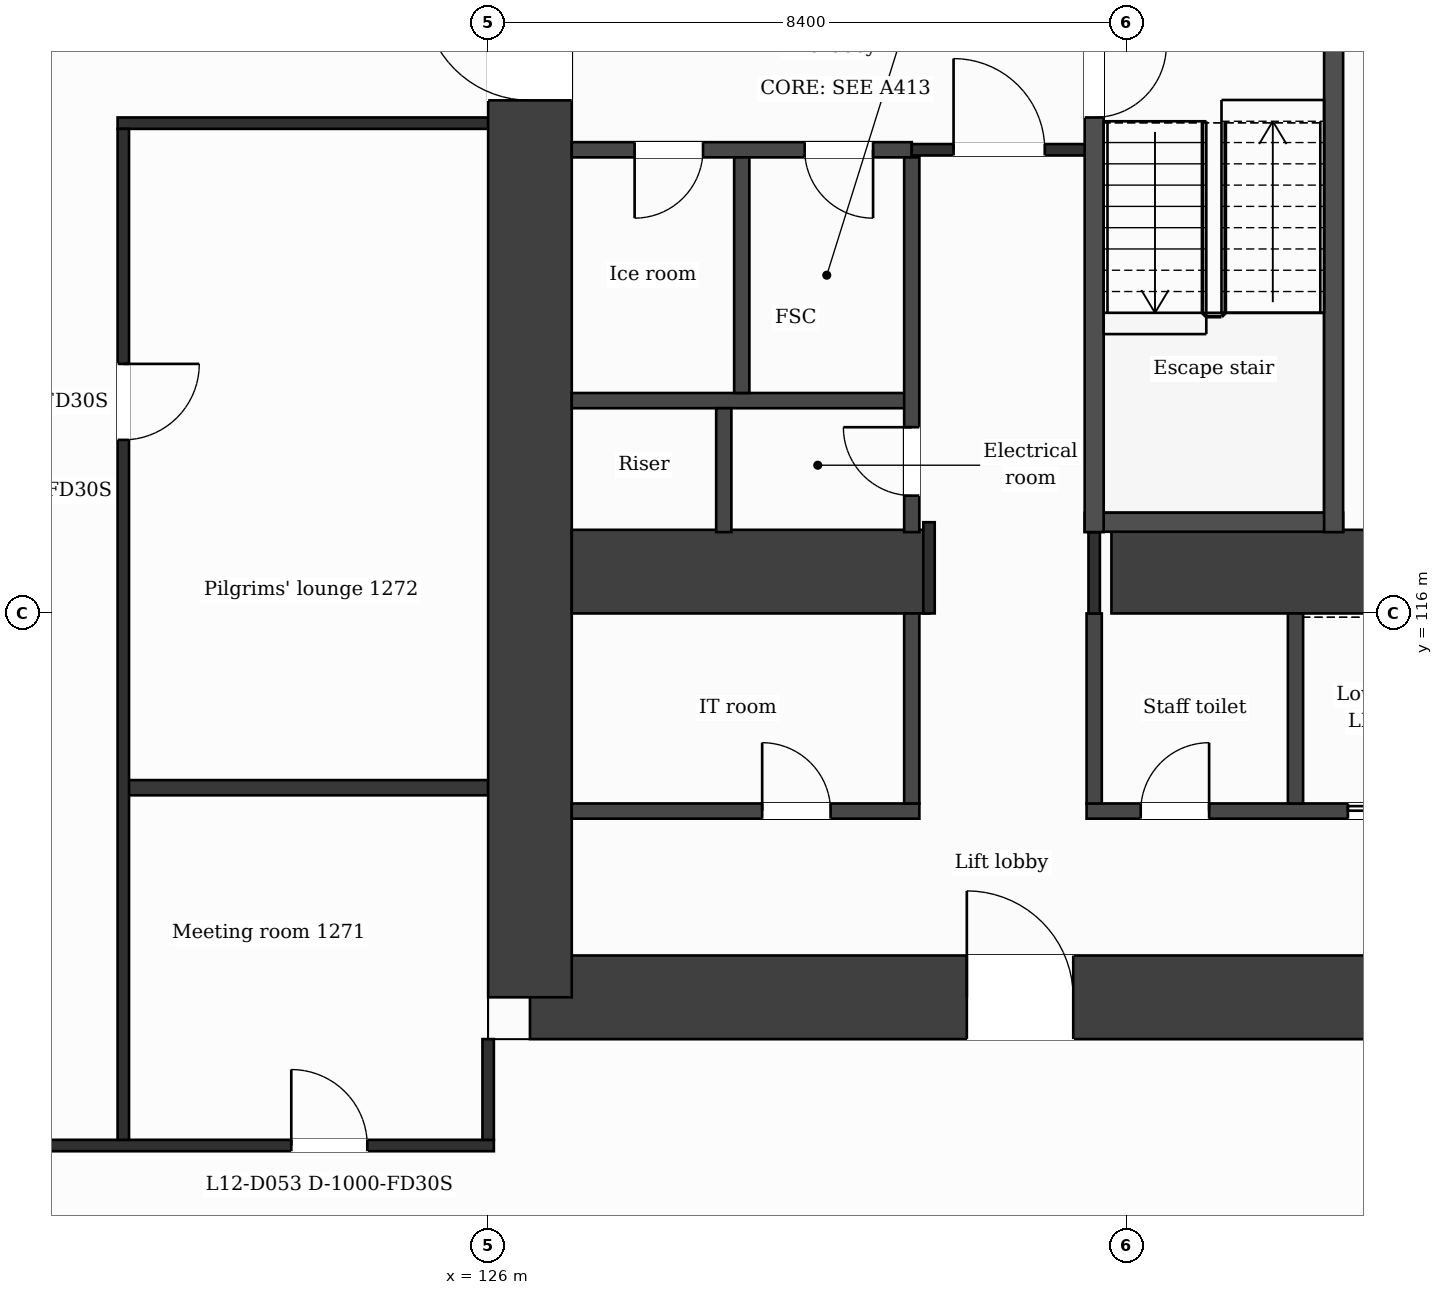
"""IFC4 building model, lengths in metres.
Left out: names, types, materials, properties, quantities, classifications, styles, units other than length and angle.
Written with IfcOpenShell. Run it as: python <this file> out.ifc"""

import sys

from ifc_helpers import new_model, si_unit, direction, frame, frame_2d, origin, place, context, subcontext, project, spatial, rectangle, extrude, element, fill, save


model = new_model("IFC4")
c1 = context("Model", 3, precision=1e-05, world=origin(), true_north=direction((0.0, 1.0)))
c2 = subcontext(c1, "Body", "Model", "MODEL_VIEW")
j1 = project(units=[si_unit("LENGTHUNIT", "METRE"), si_unit("PLANEANGLEUNIT", "RADIAN")], contexts=[c1])
p1 = place(None, origin())
s1 = spatial("IfcSite", under=j1, at=p1, CompositionType="ELEMENT")
p2 = place(p1, origin())
s2 = spatial("IfcBuilding", under=s1, at=p2, CompositionType="ELEMENT")
p3 = place(p2, frame((0.0, 0.0, 60.0)))
s3 = spatial("IfcBuildingStorey", under=s2, at=p3, CompositionType="ELEMENT", Elevation=60.0)
p4 = place(p3, frame((137.688, 131.85, 0.0), z_axis=(0.0, 0.0, 1.0), x_axis=(0.133411793472, -0.991060691059, 0.0)))
e1 = element("IfcWall", 1, at=p4, inside=s3, PredefinedType="SHEAR", context=c2, shape_type="SweptSolid", body=[
    extrude(rectangle(XDim=21.089, YDim=1.1, at=frame_2d((10.544, 0.0))), origin(), (0.0, 0.0, 1.0), 3.5),
])
p5 = place(p3, frame((140.502, 110.95, 0.0), z_axis=(0.0, 0.0, 1.0), x_axis=(-1.0, 0.0, 0.0)))
e2 = element("IfcWall", 2, at=p5, inside=s3, PredefinedType="SHEAR", context=c2, shape_type="SweptSolid", body=[
    extrude(rectangle(XDim=13.952, YDim=1.1, at=frame_2d((6.976, 0.0))), origin(), (0.0, 0.0, 1.0), 3.5),
])
p6 = place(p5, frame((6.804, 0.0, 0.0)))
e3 = element("IfcOpeningElement", 3, at=p6, cuts=e2, PredefinedType="OPENING", context=c2, shape_type="SweptSolid", body=[
    extrude(rectangle(XDim=1.4, YDim=2.1, at=frame_2d((0.7, 1.05))), frame((0.0, 0.56, 0.0), z_axis=(0.0, -1.0, 0.0), x_axis=(1.0, 0.0, 0.0)), (0.0, 0.0, 1.0), 1.12),
])
p7 = place(p3, frame((126.55, 110.95, 0.0), z_axis=(0.0, 0.0, 1.0), x_axis=(0.0, 1.0, 0.0)))
e4 = element("IfcWall", 4, at=p7, inside=s3, PredefinedType="SHEAR", context=c2, shape_type="SweptSolid", body=[
    extrude(rectangle(XDim=20.9, YDim=1.1, at=frame_2d((10.45, 0.0))), origin(), (0.0, 0.0, 1.0), 3.5),
])
p8 = place(p7, frame((11.8, 0.0, 0.0)))
e5 = element("IfcOpeningElement", 5, at=p8, cuts=e4, PredefinedType="OPENING", context=c2, shape_type="SweptSolid", body=[
    extrude(rectangle(XDim=1.4, YDim=2.1, at=frame_2d((0.7, 1.05))), frame((0.0, 0.56, 0.0), z_axis=(0.0, -1.0, 0.0), x_axis=(1.0, 0.0, 0.0)), (0.0, 0.0, 1.0), 1.12),
])
p9 = place(p3, frame((127.1, 116.55, 0.0), z_axis=(0.0, 0.0, 1.0), x_axis=(1.0, 0.0, 0.0)))
e6 = element("IfcWall", 6, at=p9, inside=s3, PredefinedType="SHEAR", context=c2, shape_type="SweptSolid", body=[
    extrude(rectangle(XDim=4.7, YDim=1.1, at=frame_2d((2.35, 0.0))), origin(), (0.0, 0.0, 1.0), 3.5),
])
p10 = place(p3, frame((134.2, 116.55, 0.0), z_axis=(0.0, 0.0, 1.0), x_axis=(1.0, 0.0, 0.0)))
e7 = element("IfcWall", 7, at=p10, inside=s3, PredefinedType="SHEAR", context=c2, shape_type="SweptSolid", body=[
    extrude(rectangle(XDim=5.077, YDim=1.1, at=frame_2d((2.539, 0.0))), origin(), (0.0, 0.0, 1.0), 3.5),
])
p11 = place(p3, frame((100.725, 109.0, 0.0), z_axis=(0.0, 0.0, 1.0), x_axis=(1.0, 0.0, 0.0)))
e8 = element("IfcWall", 8, at=p11, inside=s3, PredefinedType="PARTITIONING", context=c2, shape_type="SweptSolid", body=[
    extrude(rectangle(XDim=25.35, YDim=0.15, at=frame_2d((12.675, 0.0))), origin(), (0.0, 0.0, 1.0), 3.18),
])
p12 = place(p11, frame((1.975, 0.0, 0.0)))
e9 = element("IfcOpeningElement", 9, at=p12, cuts=e8, PredefinedType="OPENING", context=c2, shape_type="SweptSolid", body=[
    extrude(rectangle(XDim=1.0, YDim=2.1, at=frame_2d((0.5, 1.05))), frame((0.0, 0.085, 0.0), z_axis=(0.0, -1.0, 0.0), x_axis=(1.0, 0.0, 0.0)), (0.0, 0.0, 1.0), 0.17),
])
p13 = place(p11, frame((10.325, 0.0, 0.0)))
e10 = element("IfcOpeningElement", 10, at=p13, cuts=e8, PredefinedType="OPENING", context=c2, shape_type="SweptSolid", body=[
    extrude(rectangle(XDim=1.0, YDim=2.1, at=frame_2d((0.5, 1.05))), frame((0.0, 0.085, 0.0), z_axis=(0.0, -1.0, 0.0), x_axis=(1.0, 0.0, 0.0)), (0.0, 0.0, 1.0), 0.17),
])
p14 = place(p11, frame((14.9, 0.0, 0.0)))
e11 = element("IfcOpeningElement", 11, at=p14, cuts=e8, PredefinedType="OPENING", context=c2, shape_type="SweptSolid", body=[
    extrude(rectangle(XDim=1.0, YDim=2.1, at=frame_2d((0.5, 1.05))), frame((0.0, 0.085, 0.0), z_axis=(0.0, -1.0, 0.0), x_axis=(1.0, 0.0, 0.0)), (0.0, 0.0, 1.0), 0.17),
])
p15 = place(p11, frame((22.685, 0.0, 0.0)))
e12 = element("IfcOpeningElement", 12, at=p15, cuts=e8, PredefinedType="OPENING", context=c2, shape_type="SweptSolid", body=[
    extrude(rectangle(XDim=1.0, YDim=2.1, at=frame_2d((0.5, 1.05))), frame((0.0, 0.085, 0.0), z_axis=(0.0, -1.0, 0.0), x_axis=(1.0, 0.0, 0.0)), (0.0, 0.0, 1.0), 0.17),
])
p16 = place(p3, frame((127.1, 113.4, 0.0), z_axis=(0.0, 0.0, 1.0), x_axis=(1.0, 0.0, 0.0)))
e13 = element("IfcWall", 13, at=p16, inside=s3, PredefinedType="PARTITIONING", context=c2, shape_type="SweptSolid", body=[
    extrude(rectangle(XDim=4.573, YDim=0.2, at=frame_2d((2.287, 0.0))), origin(), (0.0, 0.0, 1.0), 3.18),
])
p17 = place(p16, frame((2.505, 0.0, 0.0)))
e14 = element("IfcOpeningElement", 14, at=p17, cuts=e13, PredefinedType="OPENING", context=c2, shape_type="SweptSolid", body=[
    extrude(rectangle(XDim=0.9, YDim=2.1, at=frame_2d((0.45, 1.05))), frame((0.0, 0.11, 0.0), z_axis=(0.0, -1.0, 0.0), x_axis=(1.0, 0.0, 0.0)), (0.0, 0.0, 1.0), 0.22),
])
p18 = place(p3, frame((133.873, 113.4, 0.0), z_axis=(0.0, 0.0, 1.0), x_axis=(1.0, 0.0, 0.0)))
e15 = element("IfcWall", 15, at=p18, inside=s3, PredefinedType="PARTITIONING", context=c2, shape_type="SweptSolid", body=[
    extrude(rectangle(XDim=5.774, YDim=0.2, at=frame_2d((2.887, 0.0))), origin(), (0.0, 0.0, 1.0), 3.18),
])
p19 = place(p18, frame((3.438, 0.0, 0.0)))
e16 = element("IfcOpeningElement", 16, at=p19, cuts=e15, PredefinedType="OPENING", context=c2, shape_type="SweptSolid", body=[
    extrude(rectangle(XDim=1.1, YDim=2.1, at=frame_2d((0.55, 1.05))), frame((0.0, 0.11, 0.0), z_axis=(0.0, -1.0, 0.0), x_axis=(1.0, 0.0, 0.0)), (0.0, 0.0, 1.0), 0.22),
])
p20 = place(p18, frame((0.712, 0.0, 0.0)))
e17 = element("IfcOpeningElement", 17, at=p20, cuts=e15, PredefinedType="OPENING", context=c2, shape_type="SweptSolid", body=[
    extrude(rectangle(XDim=0.9, YDim=2.1, at=frame_2d((0.45, 1.05))), frame((0.0, 0.11, 0.0), z_axis=(0.0, -1.0, 0.0), x_axis=(1.0, 0.0, 0.0)), (0.0, 0.0, 1.0), 0.22),
])
p21 = place(p3, frame((121.2, 113.708, 0.0), z_axis=(0.0, 0.0, 1.0), x_axis=(1.0, 0.0, 0.0)))
e18 = element("IfcWall", 18, at=p21, inside=s3, PredefinedType="PARTITIONING", context=c2, shape_type="SweptSolid", body=[
    extrude(rectangle(XDim=4.8, YDim=0.2, at=frame_2d((2.4, 0.0))), origin(), (0.0, 0.0, 1.0), 3.18),
])
p22 = place(p3, frame((133.848, 117.2, 0.0), z_axis=(0.0, 0.0, 1.0), x_axis=(1.0, 0.0, 0.0)))
e19 = element("IfcWall", 19, at=p22, inside=s3, PredefinedType="PARTITIONING", context=c2, shape_type="SweptSolid", body=[
    extrude(rectangle(XDim=3.4, YDim=0.25, at=frame_2d((1.7, 0.0))), origin(), (0.0, 0.0, 1.0), 3.18),
])
p23 = place(p3, frame((127.1, 118.8, 0.0), z_axis=(0.0, 0.0, 1.0), x_axis=(1.0, 0.0, 0.0)))
e20 = element("IfcWall", 20, at=p23, inside=s3, PredefinedType="PARTITIONING", context=c2, shape_type="SweptSolid", body=[
    extrude(rectangle(XDim=4.473, YDim=0.2, at=frame_2d((2.236, 0.0))), origin(), (0.0, 0.0, 1.0), 3.18),
])
p24 = place(p3, frame((127.1, 122.1, 0.0), z_axis=(0.0, 0.0, 1.0), x_axis=(1.0, 0.0, 0.0)))
e21 = element("IfcWall", 21, at=p24, inside=s3, PredefinedType="PARTITIONING", context=c2, shape_type="SweptSolid", body=[
    extrude(rectangle(XDim=4.473, YDim=0.2, at=frame_2d((2.236, 0.0))), origin(), (0.0, 0.0, 1.0), 3.18),
])
p25 = place(p24, frame((3.064, 0.0, 0.0)))
e22 = element("IfcOpeningElement", 22, at=p25, cuts=e21, PredefinedType="OPENING", context=c2, shape_type="SweptSolid", body=[
    extrude(rectangle(XDim=0.9, YDim=2.1, at=frame_2d((0.45, 1.05))), frame((0.0, 0.11, 0.0), z_axis=(0.0, -1.0, 0.0), x_axis=(1.0, 0.0, 0.0)), (0.0, 0.0, 1.0), 0.22),
])
p26 = place(p24, frame((0.827, 0.0, 0.0)))
e23 = element("IfcOpeningElement", 23, at=p26, cuts=e21, PredefinedType="OPENING", context=c2, shape_type="SweptSolid", body=[
    extrude(rectangle(XDim=0.9, YDim=2.1, at=frame_2d((0.45, 1.05))), frame((0.0, 0.11, 0.0), z_axis=(0.0, -1.0, 0.0), x_axis=(1.0, 0.0, 0.0)), (0.0, 0.0, 1.0), 0.22),
])
p27 = place(p3, frame((131.573, 122.1, 0.0), z_axis=(0.0, 0.0, 1.0), x_axis=(1.0, 0.0, 0.0)))
e24 = element("IfcWall", 24, at=p27, inside=s3, PredefinedType="PARTITIONING", context=c2, shape_type="SweptSolid", body=[
    extrude(rectangle(XDim=2.4, YDim=0.15, at=frame_2d((1.2, 0.0))), origin(), (0.0, 0.0, 1.0), 3.18),
])
p28 = place(p27, frame((0.55, 0.0, 0.0)))
e25 = element("IfcOpeningElement", 25, at=p28, cuts=e24, PredefinedType="OPENING", context=c2, shape_type="SweptSolid", body=[
    extrude(rectangle(XDim=1.2, YDim=2.1, at=frame_2d((0.6, 1.05))), frame((0.0, 0.085, 0.0), z_axis=(0.0, -1.0, 0.0), x_axis=(1.0, 0.0, 0.0)), (0.0, 0.0, 1.0), 0.17),
])
p29 = place(p3, frame((121.125, 122.45, 0.0), z_axis=(0.0, 0.0, 1.0), x_axis=(1.0, 0.0, 0.0)))
e26 = element("IfcWall", 26, at=p29, inside=s3, PredefinedType="PARTITIONING", context=c2, shape_type="SweptSolid", body=[
    extrude(rectangle(XDim=4.875, YDim=0.15, at=frame_2d((2.438, 0.0))), origin(), (0.0, 0.0, 1.0), 3.18),
])
p30 = place(p3, frame((121.2, 109.075, 0.0), z_axis=(0.0, 0.0, 1.0), x_axis=(0.0, 1.0, 0.0)))
e27 = element("IfcWall", 27, at=p30, inside=s3, PredefinedType="PARTITIONING", context=c2, shape_type="SweptSolid", body=[
    extrude(rectangle(XDim=13.3, YDim=0.15, at=frame_2d((6.65, 0.0))), origin(), (0.0, 0.0, 1.0), 3.18),
])
p31 = place(p30, frame((9.208, 0.0, 0.0)))
e28 = element("IfcOpeningElement", 28, at=p31, cuts=e27, PredefinedType="OPENING", context=c2, shape_type="SweptSolid", body=[
    extrude(rectangle(XDim=1.0, YDim=2.1, at=frame_2d((0.5, 1.05))), frame((0.0, 0.085, 0.0), z_axis=(0.0, -1.0, 0.0), x_axis=(1.0, 0.0, 0.0)), (0.0, 0.0, 1.0), 0.17),
])
p32 = place(p3, frame((126.0, 109.075, 0.0), z_axis=(0.0, 0.0, 1.0), x_axis=(0.0, 1.0, 0.0)))
e29 = element("IfcWall", 29, at=p32, inside=s3, PredefinedType="PARTITIONING", context=c2, shape_type="SweptSolid", body=[
    extrude(rectangle(XDim=1.325, YDim=0.15, at=frame_2d((0.663, 0.0))), origin(), (0.0, 0.0, 1.0), 3.18),
])
p33 = place(p3, frame((129.1, 117.07, 0.0), z_axis=(0.0, 0.0, 1.0), x_axis=(0.0, 1.0, 0.0)))
e30 = element("IfcWall", 30, at=p33, inside=s3, PredefinedType="PARTITIONING", context=c2, shape_type="SweptSolid", body=[
    extrude(rectangle(XDim=1.63, YDim=0.2, at=frame_2d((0.815, 0.0))), origin(), (0.0, 0.0, 1.0), 3.18),
])
p34 = place(p3, frame((129.336, 118.9, 0.0), z_axis=(0.0, 0.0, 1.0), x_axis=(0.0, 1.0, 0.0)))
e31 = element("IfcWall", 31, at=p34, inside=s3, PredefinedType="PARTITIONING", context=c2, shape_type="SweptSolid", body=[
    extrude(rectangle(XDim=3.1, YDim=0.2, at=frame_2d((1.55, 0.0))), origin(), (0.0, 0.0, 1.0), 3.18),
])
p35 = place(p3, frame((131.573, 113.5, 0.0), z_axis=(0.0, 0.0, 1.0), x_axis=(0.0, 1.0, 0.0)))
e32 = element("IfcWall", 32, at=p35, inside=s3, PredefinedType="PARTITIONING", context=c2, shape_type="SweptSolid", body=[
    extrude(rectangle(XDim=2.5, YDim=0.2, at=frame_2d((1.25, 0.0))), origin(), (0.0, 0.0, 1.0), 3.18),
])
p36 = place(p3, frame((131.573, 117.07, 0.0), z_axis=(0.0, 0.0, 1.0), x_axis=(0.0, 1.0, 0.0)))
e33 = element("IfcWall", 33, at=p36, inside=s3, PredefinedType="PARTITIONING", context=c2, shape_type="SweptSolid", body=[
    extrude(rectangle(XDim=4.93, YDim=0.2, at=frame_2d((2.465, 0.0))), origin(), (0.0, 0.0, 1.0), 3.18),
])
p37 = place(p36, frame((0.48, 0.0, 0.0)))
e34 = element("IfcOpeningElement", 34, at=p37, cuts=e33, PredefinedType="OPENING", context=c2, shape_type="SweptSolid", body=[
    extrude(rectangle(XDim=0.9, YDim=2.1, at=frame_2d((0.45, 1.05))), frame((0.0, 0.11, 0.0), z_axis=(0.0, -1.0, 0.0), x_axis=(1.0, 0.0, 0.0)), (0.0, 0.0, 1.0), 0.22),
])
p38 = place(p3, frame((131.8, 116.0, 0.0), z_axis=(0.0, 0.0, 1.0), x_axis=(0.0, 1.0, 0.0)))
e35 = element("IfcWall", 35, at=p38, inside=s3, PredefinedType="PARTITIONING", context=c2, shape_type="SweptSolid", body=[
    extrude(rectangle(XDim=1.2, YDim=0.15, at=frame_2d((0.6, 0.0))), origin(), (0.0, 0.0, 1.0), 3.18),
])
p39 = place(p3, frame((133.973, 113.5, 0.0), z_axis=(0.0, 0.0, 1.0), x_axis=(0.0, 1.0, 0.0)))
e36 = element("IfcWall", 36, at=p39, inside=s3, PredefinedType="PARTITIONING", context=c2, shape_type="SweptSolid", body=[
    extrude(rectangle(XDim=2.5, YDim=0.2, at=frame_2d((1.25, 0.0))), origin(), (0.0, 0.0, 1.0), 3.18),
])
p40 = place(p3, frame((133.973, 116.0, 0.0), z_axis=(0.0, 0.0, 1.0), x_axis=(0.0, 1.0, 0.0)))
e37 = element("IfcWall", 37, at=p40, inside=s3, PredefinedType="PARTITIONING", context=c2, shape_type="SweptSolid", body=[
    extrude(rectangle(XDim=1.07, YDim=0.15, at=frame_2d((0.535, 0.0))), origin(), (0.0, 0.0, 1.0), 3.18),
])
p41 = place(p3, frame((133.973, 117.07, 0.0), z_axis=(0.0, 0.0, 1.0), x_axis=(0.0, 1.0, 0.0)))
e38 = element("IfcWall", 38, at=p41, inside=s3, PredefinedType="PARTITIONING", context=c2, shape_type="SweptSolid", body=[
    extrude(rectangle(XDim=6.755, YDim=0.25, at=frame_2d((3.377, 0.0))), origin(), (0.0, 0.0, 1.0), 3.18),
])
p42 = place(p41, frame((5.455, 0.0, 0.0)))
e39 = element("IfcOpeningElement", 39, at=p42, cuts=e38, PredefinedType="OPENING", context=c2, shape_type="SweptSolid", body=[
    extrude(rectangle(XDim=0.95, YDim=2.1, at=frame_2d((0.475, 1.05))), frame((0.0, 0.135, 0.0), z_axis=(0.0, -1.0, 0.0), x_axis=(1.0, 0.0, 0.0)), (0.0, 0.0, 1.0), 0.27),
])
p43 = place(p3, frame((136.622, 113.5, 0.0), z_axis=(0.0, 0.0, 1.0), x_axis=(0.0, 1.0, 0.0)))
e40 = element("IfcWall", 40, at=p43, inside=s3, PredefinedType="PARTITIONING", context=c2, shape_type="SweptSolid", body=[
    extrude(rectangle(XDim=2.5, YDim=0.2, at=frame_2d((1.25, 0.0))), origin(), (0.0, 0.0, 1.0), 3.18),
])
p44 = place(p3, frame((137.123, 117.07, 0.0), z_axis=(0.0, 0.0, 1.0), x_axis=(0.0, 1.0, 0.0)))
e41 = element("IfcWall", 41, at=p44, inside=s3, PredefinedType="PARTITIONING", context=c2, shape_type="SweptSolid", body=[
    extrude(rectangle(XDim=6.755, YDim=0.25, at=frame_2d((3.377, 0.0))), origin(), (0.0, 0.0, 1.0), 3.18),
])
p45 = place(p28, origin())
e42 = element("IfcDoor", 42, at=p45, inside=s3, OperationType="SINGLE_SWING_LEFT", PredefinedType="DOOR", context=c2, shape_type="SweptSolid", body=[
    extrude(rectangle(XDim=1.2, YDim=2.1, at=frame_2d((0.6, 1.05))), frame((0.0, 0.025, 0.0), z_axis=(0.0, -1.0, 0.0), x_axis=(1.0, 0.0, 0.0)), (0.0, 0.0, 1.0), 0.05),
])
fill(e25, e42)
p46 = place(p25, origin())
e43 = element("IfcDoor", 43, at=p46, inside=s3, OperationType="SINGLE_SWING_RIGHT", PredefinedType="DOOR", context=c2, shape_type="SweptSolid", body=[
    extrude(rectangle(XDim=0.9, YDim=2.1, at=frame_2d((0.45, 1.05))), frame((0.0, 0.025, 0.0), z_axis=(0.0, -1.0, 0.0), x_axis=(1.0, 0.0, 0.0)), (0.0, 0.0, 1.0), 0.05),
])
fill(e22, e43)
p47 = place(p26, origin())
e44 = element("IfcDoor", 44, at=p47, inside=s3, OperationType="SINGLE_SWING_LEFT", PredefinedType="DOOR", context=c2, shape_type="SweptSolid", body=[
    extrude(rectangle(XDim=0.9, YDim=2.1, at=frame_2d((0.45, 1.05))), frame((0.0, 0.025, 0.0), z_axis=(0.0, -1.0, 0.0), x_axis=(1.0, 0.0, 0.0)), (0.0, 0.0, 1.0), 0.05),
])
fill(e23, e44)
p48 = place(p42, origin())
e45 = element("IfcDoor", 45, at=p48, inside=s3, OperationType="SINGLE_SWING_RIGHT", PredefinedType="DOOR", context=c2, shape_type="SweptSolid", body=[
    extrude(rectangle(XDim=0.95, YDim=2.1, at=frame_2d((0.475, 1.05))), frame((0.0, 0.025, 0.0), z_axis=(0.0, -1.0, 0.0), x_axis=(1.0, 0.0, 0.0)), (0.0, 0.0, 1.0), 0.05),
])
fill(e39, e45)
p49 = place(p37, origin())
e46 = element("IfcDoor", 46, at=p49, inside=s3, OperationType="SINGLE_SWING_RIGHT", PredefinedType="DOOR", context=c2, shape_type="SweptSolid", body=[
    extrude(rectangle(XDim=0.9, YDim=2.1, at=frame_2d((0.45, 1.05))), frame((0.0, 0.025, 0.0), z_axis=(0.0, -1.0, 0.0), x_axis=(1.0, 0.0, 0.0)), (0.0, 0.0, 1.0), 0.05),
])
fill(e34, e46)
p50 = place(p19, origin())
e47 = element("IfcDoor", 47, at=p50, inside=s3, OperationType="SLIDING_TO_LEFT", PredefinedType="DOOR", context=c2, shape_type="SweptSolid", body=[
    extrude(rectangle(XDim=1.1, YDim=2.1, at=frame_2d((0.55, 1.05))), frame((0.0, 0.025, 0.0), z_axis=(0.0, -1.0, 0.0), x_axis=(1.0, 0.0, 0.0)), (0.0, 0.0, 1.0), 0.05),
])
fill(e16, e47)
p51 = place(p20, origin())
e48 = element("IfcDoor", 48, at=p51, inside=s3, OperationType="SINGLE_SWING_RIGHT", PredefinedType="DOOR", context=c2, shape_type="SweptSolid", body=[
    extrude(rectangle(XDim=0.9, YDim=2.1, at=frame_2d((0.45, 1.05))), frame((0.0, 0.025, 0.0), z_axis=(0.0, -1.0, 0.0), x_axis=(1.0, 0.0, 0.0)), (0.0, 0.0, 1.0), 0.05),
])
fill(e17, e48)
p52 = place(p17, origin())
e49 = element("IfcDoor", 49, at=p52, inside=s3, OperationType="SINGLE_SWING_LEFT", PredefinedType="DOOR", context=c2, shape_type="SweptSolid", body=[
    extrude(rectangle(XDim=0.9, YDim=2.1, at=frame_2d((0.45, 1.05))), frame((0.0, 0.025, 0.0), z_axis=(0.0, -1.0, 0.0), x_axis=(1.0, 0.0, 0.0)), (0.0, 0.0, 1.0), 0.05),
])
fill(e14, e49)
p53 = place(p15, origin())
e50 = element("IfcDoor", 50, at=p53, inside=s3, OperationType="SINGLE_SWING_LEFT", PredefinedType="DOOR", context=c2, shape_type="SweptSolid", body=[
    extrude(rectangle(XDim=1.0, YDim=2.1, at=frame_2d((0.5, 1.05))), frame((0.0, 0.025, 0.0), z_axis=(0.0, -1.0, 0.0), x_axis=(1.0, 0.0, 0.0)), (0.0, 0.0, 1.0), 0.05),
])
fill(e12, e50)
p54 = place(p31, origin())
e51 = element("IfcDoor", 51, at=p54, inside=s3, OperationType="SINGLE_SWING_RIGHT", PredefinedType="DOOR", context=c2, shape_type="SweptSolid", body=[
    extrude(rectangle(XDim=1.0, YDim=2.1, at=frame_2d((0.5, 1.05))), frame((0.0, 0.025, 0.0), z_axis=(0.0, -1.0, 0.0), x_axis=(1.0, 0.0, 0.0)), (0.0, 0.0, 1.0), 0.05),
])
fill(e28, e51)
p55 = place(p6, origin())
e52 = element("IfcDoor", 52, at=p55, inside=s3, OperationType="SINGLE_SWING_RIGHT", PredefinedType="DOOR", context=c2, shape_type="SweptSolid", body=[
    extrude(rectangle(XDim=1.4, YDim=2.1, at=frame_2d((0.7, 1.05))), frame((0.0, 0.025, 0.0), z_axis=(0.0, -1.0, 0.0), x_axis=(1.0, 0.0, 0.0)), (0.0, 0.0, 1.0), 0.05),
])
fill(e3, e52)
p56 = place(p8, origin())
e53 = element("IfcDoor", 53, at=p56, inside=s3, OperationType="SINGLE_SWING_RIGHT", PredefinedType="DOOR", context=c2, shape_type="SweptSolid", body=[
    extrude(rectangle(XDim=1.4, YDim=2.1, at=frame_2d((0.7, 1.05))), frame((0.0, 0.025, 0.0), z_axis=(0.0, -1.0, 0.0), x_axis=(1.0, 0.0, 0.0)), (0.0, 0.0, 1.0), 0.05),
])
fill(e5, e53)
save(model, sys.argv[1])
